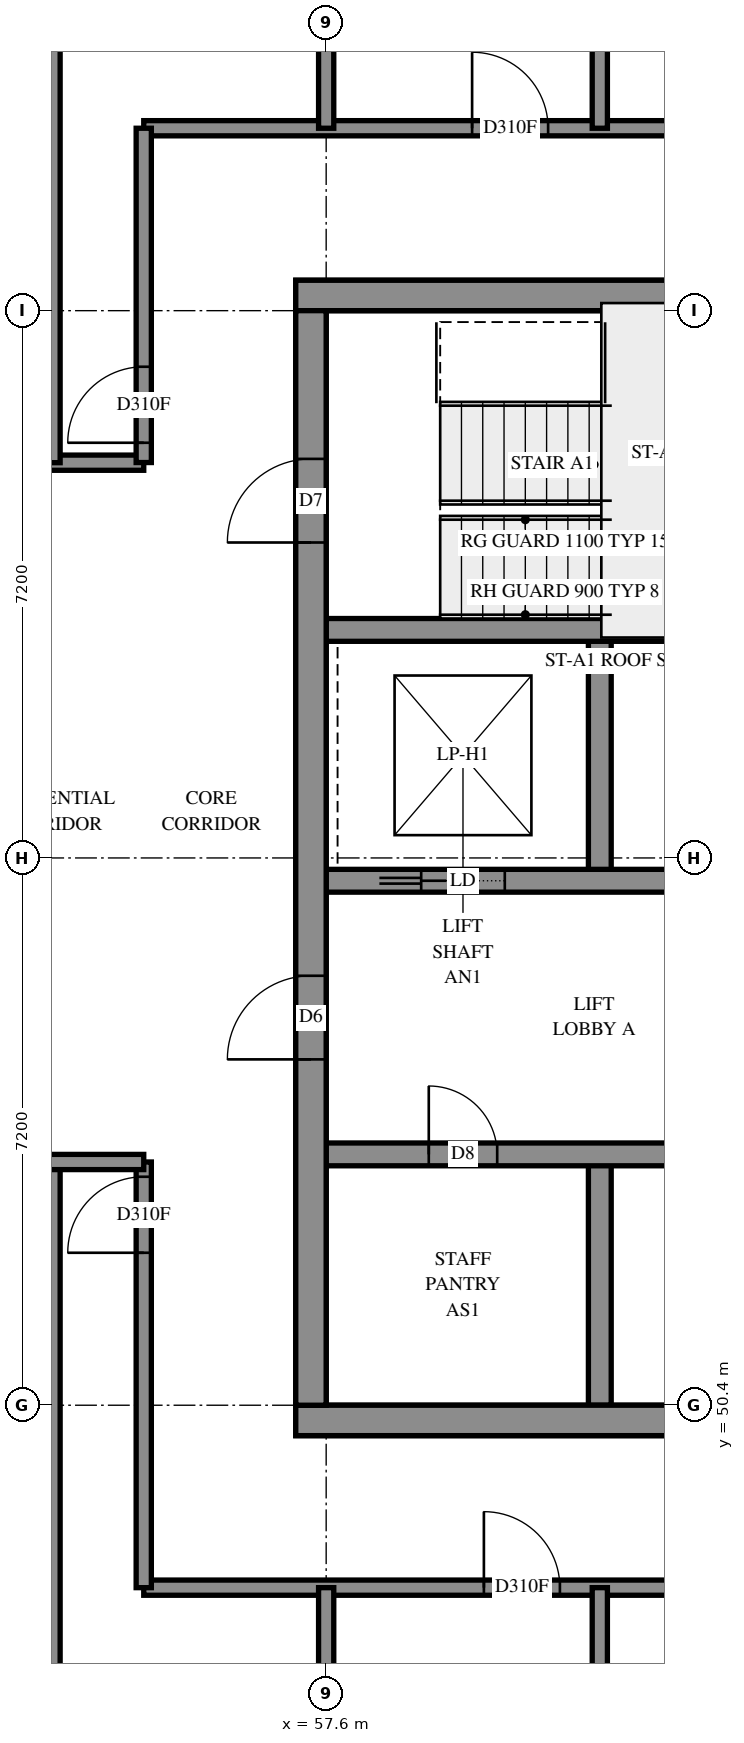
"""IFC4 building model, lengths in metres.
Left out: names, types, materials, properties, quantities, classifications, styles, units other than length and angle.
Written with IfcOpenShell. Run it as: python <this file> out.ifc"""

import sys

from ifc_helpers import new_model, si_unit, direction, frame, frame_2d, origin, place, context, subcontext, project, spatial, rectangle, extrude, element, fill, save


model = new_model("IFC4")
c1 = context("Model", 3, precision=1e-05, world=origin(), true_north=direction((0.0, 1.0)))
c2 = subcontext(c1, "Body", "Model", "MODEL_VIEW")
j1 = project(units=[si_unit("LENGTHUNIT", "METRE"), si_unit("PLANEANGLEUNIT", "RADIAN")], contexts=[c1])
p1 = place(None, origin())
s1 = spatial("IfcSite", under=j1, at=p1, CompositionType="ELEMENT")
p2 = place(p1, origin())
s2 = spatial("IfcBuilding", under=s1, at=p2, CompositionType="ELEMENT")
p3 = place(p2, frame((0.0, 0.0, 267.6)))
s3 = spatial("IfcBuildingStorey", under=s2, at=p3, CompositionType="ELEMENT", Elevation=267.6)
p4 = place(p3, frame((57.2, 50.2, -0.3), z_axis=(0.0, 0.0, 1.0), x_axis=(1.0, 0.0, 0.0)))
e1 = element("IfcWall", 1, at=p4, inside=s3, PredefinedType="SHEAR", context=c2, shape_type="SweptSolid", body=[
    extrude(rectangle(XDim=15.2, YDim=0.4, at=frame_2d((7.6, 0.0))), origin(), (0.0, 0.0, 1.0), 2.7),
])
p5 = place(p3, frame((57.2, 65.0, -0.3), z_axis=(0.0, 0.0, 1.0), x_axis=(1.0, 0.0, 0.0)))
e2 = element("IfcWall", 2, at=p5, inside=s3, PredefinedType="SHEAR", context=c2, shape_type="SweptSolid", body=[
    extrude(rectangle(XDim=15.2, YDim=0.4, at=frame_2d((7.6, 0.0))), origin(), (0.0, 0.0, 1.0), 2.7),
])
p6 = place(p5, frame((10.4, 0.0, 0.3)))
e3 = element("IfcOpeningElement", 3, at=p6, cuts=e2, PredefinedType="OPENING", context=c2, shape_type="SweptSolid", body=[
    extrude(rectangle(XDim=0.8, YDim=2.1, at=frame_2d((0.4, 1.05))), frame((0.0, 0.21, 0.0), z_axis=(0.0, -1.0, 0.0), x_axis=(1.0, 0.0, 0.0)), (0.0, 0.0, 1.0), 0.42),
])
p7 = place(p3, frame((57.4, 50.4, -0.3), z_axis=(0.0, 0.0, 1.0), x_axis=(0.0, 1.0, 0.0)))
e4 = element("IfcWall", 4, at=p7, inside=s3, PredefinedType="SHEAR", context=c2, shape_type="SweptSolid", body=[
    extrude(rectangle(XDim=14.4, YDim=0.4, at=frame_2d((7.2, 0.0))), origin(), (0.0, 0.0, 1.0), 2.7),
])
p8 = place(p7, frame((4.55, 0.0, 0.3)))
e5 = element("IfcOpeningElement", 5, at=p8, cuts=e4, PredefinedType="OPENING", context=c2, shape_type="SweptSolid", body=[
    extrude(rectangle(XDim=1.1, YDim=2.1, at=frame_2d((0.55, 1.05))), frame((0.0, 0.21, 0.0), z_axis=(0.0, -1.0, 0.0), x_axis=(1.0, 0.0, 0.0)), (0.0, 0.0, 1.0), 0.42),
])
p9 = place(p7, frame((11.35, 0.0, 0.3)))
e6 = element("IfcOpeningElement", 6, at=p9, cuts=e4, PredefinedType="OPENING", context=c2, shape_type="SweptSolid", body=[
    extrude(rectangle(XDim=1.1, YDim=2.1, at=frame_2d((0.55, 1.05))), frame((0.0, 0.21, 0.0), z_axis=(0.0, -1.0, 0.0), x_axis=(1.0, 0.0, 0.0)), (0.0, 0.0, 1.0), 0.42),
])
for number, where, z_axis, x_axis in (
    (7, (61.2, 50.4, 0.0), (0.0, 0.0, 1.0), (0.0, 1.0, 0.0)),
    (8, (61.2, 57.3, 0.0), (0.0, 0.0, 1.0), (0.0, 1.0, 0.0)),
):
    element("IfcWall", number, at=place(p3, frame(where, z_axis=z_axis, x_axis=x_axis)), inside=s3, PredefinedType="SOLIDWALL", context=c2, shape_type="SweptSolid", body=[
        extrude(rectangle(XDim=3.3, YDim=0.3, at=frame_2d((1.65, 0.0))), origin(), (0.0, 0.0, 1.0), 3.1),
    ])
p10 = place(p3, frame((57.6, 53.7, 0.0), z_axis=(0.0, 0.0, 1.0), x_axis=(1.0, 0.0, 0.0)))
e9 = element("IfcWall", 9, at=p10, inside=s3, PredefinedType="SOLIDWALL", context=c2, shape_type="SweptSolid", body=[
    extrude(rectangle(XDim=14.4, YDim=0.3, at=frame_2d((7.2, 0.0))), origin(), (0.0, 0.0, 1.0), 3.1),
])
p11 = place(p10, frame((1.35, 0.0, 0.0)))
e10 = element("IfcOpeningElement", 10, at=p11, cuts=e9, PredefinedType="OPENING", context=c2, shape_type="SweptSolid", body=[
    extrude(rectangle(XDim=0.9, YDim=2.1, at=frame_2d((0.45, 1.05))), frame((0.0, 0.16, 0.0), z_axis=(0.0, -1.0, 0.0), x_axis=(1.0, 0.0, 0.0)), (0.0, 0.0, 1.0), 0.32),
])
p12 = place(p10, frame((4.95, 0.0, 0.0)))
e11 = element("IfcOpeningElement", 11, at=p12, cuts=e9, PredefinedType="OPENING", context=c2, shape_type="SweptSolid", body=[
    extrude(rectangle(XDim=0.9, YDim=2.1, at=frame_2d((0.45, 1.05))), frame((0.0, 0.16, 0.0), z_axis=(0.0, -1.0, 0.0), x_axis=(1.0, 0.0, 0.0)), (0.0, 0.0, 1.0), 0.32),
])
p13 = place(p10, frame((8.55, 0.0, 0.0)))
e12 = element("IfcOpeningElement", 12, at=p13, cuts=e9, PredefinedType="OPENING", context=c2, shape_type="SweptSolid", body=[
    extrude(rectangle(XDim=0.9, YDim=2.1, at=frame_2d((0.45, 1.05))), frame((0.0, 0.16, 0.0), z_axis=(0.0, -1.0, 0.0), x_axis=(1.0, 0.0, 0.0)), (0.0, 0.0, 1.0), 0.32),
])
p14 = place(p10, frame((12.05, 0.0, 0.0)))
e13 = element("IfcOpeningElement", 13, at=p14, cuts=e9, PredefinedType="OPENING", context=c2, shape_type="SweptSolid", body=[
    extrude(rectangle(XDim=1.1, YDim=2.1, at=frame_2d((0.55, 1.05))), frame((0.0, 0.16, 0.0), z_axis=(0.0, -1.0, 0.0), x_axis=(1.0, 0.0, 0.0)), (0.0, 0.0, 1.0), 0.32),
])
p15 = place(p3, frame((57.6, 57.3, 0.0), z_axis=(0.0, 0.0, 1.0), x_axis=(1.0, 0.0, 0.0)))
e14 = element("IfcWall", 14, at=p15, inside=s3, PredefinedType="SOLIDWALL", context=c2, shape_type="SweptSolid", body=[
    extrude(rectangle(XDim=14.4, YDim=0.3, at=frame_2d((7.2, 0.0))), origin(), (0.0, 0.0, 1.0), 3.1),
])
p16 = place(p15, frame((8.55, 0.0, 0.0)))
e15 = element("IfcOpeningElement", 15, at=p16, cuts=e14, PredefinedType="OPENING", context=c2, shape_type="SweptSolid", body=[
    extrude(rectangle(XDim=0.9, YDim=2.1, at=frame_2d((0.45, 1.05))), frame((0.0, 0.16, 0.0), z_axis=(0.0, -1.0, 0.0), x_axis=(1.0, 0.0, 0.0)), (0.0, 0.0, 1.0), 0.32),
])
p17 = place(p15, frame((1.25, 0.0, 0.0)))
e16 = element("IfcOpeningElement", 16, at=p17, cuts=e14, PredefinedType="OPENING", context=c2, shape_type="SweptSolid", body=[
    extrude(rectangle(XDim=1.1, YDim=2.1, at=frame_2d((0.55, 1.05))), frame((0.0, 0.16, 0.0), z_axis=(0.0, -1.0, 0.0), x_axis=(1.0, 0.0, 0.0)), (0.0, 0.0, 1.0), 0.32),
])
p18 = place(p15, frame((4.85, 0.0, 0.0)))
e17 = element("IfcOpeningElement", 17, at=p18, cuts=e14, PredefinedType="OPENING", context=c2, shape_type="SweptSolid", body=[
    extrude(rectangle(XDim=1.1, YDim=2.1, at=frame_2d((0.55, 1.05))), frame((0.0, 0.16, 0.0), z_axis=(0.0, -1.0, 0.0), x_axis=(1.0, 0.0, 0.0)), (0.0, 0.0, 1.0), 0.32),
])
p19 = place(p15, frame((12.05, 0.0, 0.0)))
e18 = element("IfcOpeningElement", 18, at=p19, cuts=e14, PredefinedType="OPENING", context=c2, shape_type="SweptSolid", body=[
    extrude(rectangle(XDim=1.1, YDim=2.1, at=frame_2d((0.55, 1.05))), frame((0.0, 0.16, 0.0), z_axis=(0.0, -1.0, 0.0), x_axis=(1.0, 0.0, 0.0)), (0.0, 0.0, 1.0), 0.32),
])
p20 = place(p3, frame((57.6, 60.6, 0.0), z_axis=(0.0, 0.0, 1.0), x_axis=(1.0, 0.0, 0.0)))
e19 = element("IfcWall", 19, at=p20, inside=s3, PredefinedType="SOLIDWALL", context=c2, shape_type="SweptSolid", body=[
    extrude(rectangle(XDim=7.2, YDim=0.3, at=frame_2d((3.6, 0.0))), origin(), (0.0, 0.0, 1.0), 3.1),
])
p21 = place(p3, frame((55.2, 67.2, 0.0), z_axis=(0.0, 0.0, 1.0), x_axis=(1.0, 0.0, 0.0)))
e20 = element("IfcWall", 20, at=p21, inside=s3, PredefinedType="PARTITIONING", context=c2, shape_type="SweptSolid", body=[
    extrude(rectangle(XDim=19.2, YDim=0.2, at=frame_2d((9.6, 0.0))), origin(), (0.0, 0.0, 1.0), 3.1),
])
p22 = place(p21, frame((4.32, 0.0, 0.0)))
e21 = element("IfcOpeningElement", 21, at=p22, cuts=e20, PredefinedType="OPENING", context=c2, shape_type="SweptSolid", body=[
    extrude(rectangle(XDim=1.0, YDim=2.1, at=frame_2d((0.5, 1.05))), frame((0.0, 0.11, 0.0), z_axis=(0.0, -1.0, 0.0), x_axis=(1.0, 0.0, 0.0)), (0.0, 0.0, 1.0), 0.22),
])
p23 = place(p21, frame((8.338, 0.0, 0.0)))
e22 = element("IfcOpeningElement", 22, at=p23, cuts=e20, PredefinedType="OPENING", context=c2, shape_type="SweptSolid", body=[
    extrude(rectangle(XDim=1.0, YDim=2.1, at=frame_2d((0.5, 1.05))), frame((0.0, 0.11, 0.0), z_axis=(0.0, -1.0, 0.0), x_axis=(1.0, 0.0, 0.0)), (0.0, 0.0, 1.0), 0.22),
])
p24 = place(p21, frame((13.768, 0.0, 0.0)))
e23 = element("IfcOpeningElement", 23, at=p24, cuts=e20, PredefinedType="OPENING", context=c2, shape_type="SweptSolid", body=[
    extrude(rectangle(XDim=1.0, YDim=2.1, at=frame_2d((0.5, 1.05))), frame((0.0, 0.11, 0.0), z_axis=(0.0, -1.0, 0.0), x_axis=(1.0, 0.0, 0.0)), (0.0, 0.0, 1.0), 0.22),
])
p25 = place(p3, frame((55.2, 48.0, 0.0), z_axis=(0.0, 0.0, 1.0), x_axis=(1.0, 0.0, 0.0)))
e24 = element("IfcWall", 24, at=p25, inside=s3, PredefinedType="PARTITIONING", context=c2, shape_type="SweptSolid", body=[
    extrude(rectangle(XDim=19.15, YDim=0.2, at=frame_2d((9.575, 0.0))), origin(), (0.0, 0.0, 1.0), 3.1),
])
p26 = place(p25, frame((4.475, 0.0, 0.0)))
e25 = element("IfcOpeningElement", 25, at=p26, cuts=e24, PredefinedType="OPENING", context=c2, shape_type="SweptSolid", body=[
    extrude(rectangle(XDim=1.0, YDim=2.1, at=frame_2d((0.5, 1.05))), frame((0.0, 0.11, 0.0), z_axis=(0.0, -1.0, 0.0), x_axis=(1.0, 0.0, 0.0)), (0.0, 0.0, 1.0), 0.22),
])
p27 = place(p25, frame((8.301, 0.0, 0.0)))
e26 = element("IfcOpeningElement", 26, at=p27, cuts=e24, PredefinedType="OPENING", context=c2, shape_type="SweptSolid", body=[
    extrude(rectangle(XDim=0.9, YDim=2.1, at=frame_2d((0.45, 1.05))), frame((0.0, 0.11, 0.0), z_axis=(0.0, -1.0, 0.0), x_axis=(1.0, 0.0, 0.0)), (0.0, 0.0, 1.0), 0.22),
])
p28 = place(p25, frame((13.707, 0.0, 0.0)))
e27 = element("IfcOpeningElement", 27, at=p28, cuts=e24, PredefinedType="OPENING", context=c2, shape_type="SweptSolid", body=[
    extrude(rectangle(XDim=1.0, YDim=2.1, at=frame_2d((0.5, 1.05))), frame((0.0, 0.11, 0.0), z_axis=(0.0, -1.0, 0.0), x_axis=(1.0, 0.0, 0.0)), (0.0, 0.0, 1.0), 0.22),
])
p29 = place(p3, frame((40.61, 62.8, 0.0), z_axis=(0.0, 0.0, 1.0), x_axis=(1.0, 0.0, 0.0)))
e28 = element("IfcWall", 28, at=p29, inside=s3, PredefinedType="PARTITIONING", context=c2, shape_type="SweptSolid", body=[
    extrude(rectangle(XDim=14.59, YDim=0.2, at=frame_2d((7.295, 0.0))), origin(), (0.0, 0.0, 1.0), 3.1),
])
p30 = place(p29, frame((1.82, 0.0, 0.0)))
e29 = element("IfcOpeningElement", 29, at=p30, cuts=e28, PredefinedType="OPENING", context=c2, shape_type="SweptSolid", body=[
    extrude(rectangle(XDim=1.0, YDim=2.1, at=frame_2d((0.5, 1.05))), frame((0.0, 0.11, 0.0), z_axis=(0.0, -1.0, 0.0), x_axis=(1.0, 0.0, 0.0)), (0.0, 0.0, 1.0), 0.22),
])
p31 = place(p29, frame((6.758, 0.0, 0.0)))
e30 = element("IfcOpeningElement", 30, at=p31, cuts=e28, PredefinedType="OPENING", context=c2, shape_type="SweptSolid", body=[
    extrude(rectangle(XDim=1.0, YDim=2.1, at=frame_2d((0.5, 1.05))), frame((0.0, 0.11, 0.0), z_axis=(0.0, -1.0, 0.0), x_axis=(1.0, 0.0, 0.0)), (0.0, 0.0, 1.0), 0.22),
])
p32 = place(p29, frame((10.005, 0.0, 0.0)))
e31 = element("IfcOpeningElement", 31, at=p32, cuts=e28, PredefinedType="OPENING", context=c2, shape_type="SweptSolid", body=[
    extrude(rectangle(XDim=1.0, YDim=2.1, at=frame_2d((0.5, 1.05))), frame((0.0, 0.11, 0.0), z_axis=(0.0, -1.0, 0.0), x_axis=(1.0, 0.0, 0.0)), (0.0, 0.0, 1.0), 0.22),
])
p33 = place(p3, frame((54.0, 42.285, 0.0), z_axis=(0.0, 0.0, 1.0), x_axis=(0.0, 1.0, 0.0)))
e32 = element("IfcWall", 32, at=p33, inside=s3, PredefinedType="PARTITIONING", context=c2, shape_type="SweptSolid", body=[
    extrude(rectangle(XDim=11.315, YDim=0.2, at=frame_2d((5.657, 0.0))), origin(), (0.0, 0.0, 1.0), 3.1),
])
p34 = place(p3, frame((54.0, 62.8, 0.0), z_axis=(0.0, 0.0, 1.0), x_axis=(0.0, 1.0, 0.0)))
e33 = element("IfcWall", 33, at=p34, inside=s3, PredefinedType="PARTITIONING", context=c2, shape_type="SweptSolid", body=[
    extrude(rectangle(XDim=10.036, YDim=0.2, at=frame_2d((5.018, 0.0))), origin(), (0.0, 0.0, 1.0), 3.1),
])
p35 = place(p3, frame((61.2, 42.288, 0.0), z_axis=(0.0, 0.0, 1.0), x_axis=(0.0, 1.0, 0.0)))
e34 = element("IfcWall", 34, at=p35, inside=s3, PredefinedType="PARTITIONING", context=c2, shape_type="SweptSolid", body=[
    extrude(rectangle(XDim=5.712, YDim=0.2, at=frame_2d((2.856, 0.0))), origin(), (0.0, 0.0, 1.0), 3.1),
])
p36 = place(p3, frame((55.2, 48.0, 0.0), z_axis=(0.0, 0.0, 1.0), x_axis=(0.0, 1.0, 0.0)))
e35 = element("IfcWall", 35, at=p36, inside=s3, PredefinedType="PARTITIONING", context=c2, shape_type="SweptSolid", body=[
    extrude(rectangle(XDim=5.6, YDim=0.2, at=frame_2d((2.8, 0.0))), origin(), (0.0, 0.0, 1.0), 3.1),
])
p37 = place(p36, frame((4.406, 0.0, 0.0)))
e36 = element("IfcOpeningElement", 36, at=p37, cuts=e35, PredefinedType="OPENING", context=c2, shape_type="SweptSolid", body=[
    extrude(rectangle(XDim=1.0, YDim=2.1, at=frame_2d((0.5, 1.05))), frame((0.0, 0.11, 0.0), z_axis=(0.0, -1.0, 0.0), x_axis=(1.0, 0.0, 0.0)), (0.0, 0.0, 1.0), 0.22),
])
p38 = place(p3, frame((61.2, 67.2, 0.0), z_axis=(0.0, 0.0, 1.0), x_axis=(0.0, 1.0, 0.0)))
e37 = element("IfcWall", 37, at=p38, inside=s3, PredefinedType="PARTITIONING", context=c2, shape_type="SweptSolid", body=[
    extrude(rectangle(XDim=5.574, YDim=0.2, at=frame_2d((2.787, 0.0))), origin(), (0.0, 0.0, 1.0), 3.1),
])
p39 = place(p3, frame((50.4, 53.6, 0.0), z_axis=(0.0, 0.0, 1.0), x_axis=(1.0, 0.0, 0.0)))
e38 = element("IfcWall", 38, at=p39, inside=s3, PredefinedType="PARTITIONING", context=c2, shape_type="SweptSolid", body=[
    extrude(rectangle(XDim=4.8, YDim=0.2, at=frame_2d((2.4, 0.0))), origin(), (0.0, 0.0, 1.0), 3.1),
])
p40 = place(p39, frame((2.075, 0.0, 0.0)))
e39 = element("IfcOpeningElement", 39, at=p40, cuts=e38, PredefinedType="OPENING", context=c2, shape_type="SweptSolid", body=[
    extrude(rectangle(XDim=1.0, YDim=2.1, at=frame_2d((0.5, 1.05))), frame((0.0, 0.11, 0.0), z_axis=(0.0, -1.0, 0.0), x_axis=(1.0, 0.0, 0.0)), (0.0, 0.0, 1.0), 0.22),
])
p41 = place(p3, frame((57.6, 43.55, 0.0), z_axis=(0.0, 0.0, 1.0), x_axis=(0.0, 1.0, 0.0)))
e40 = element("IfcWall", 40, at=p41, inside=s3, PredefinedType="PARTITIONING", context=c2, shape_type="SweptSolid", body=[
    extrude(rectangle(XDim=4.45, YDim=0.2, at=frame_2d((2.225, 0.0))), origin(), (0.0, 0.0, 1.0), 3.1),
])
p42 = place(p3, frame((55.2, 62.802, 0.0), z_axis=(0.0, 0.0, 1.0), x_axis=(0.0, 1.0, 0.0)))
e41 = element("IfcWall", 41, at=p42, inside=s3, PredefinedType="PARTITIONING", context=c2, shape_type="SweptSolid", body=[
    extrude(rectangle(XDim=4.398, YDim=0.2, at=frame_2d((2.199, 0.0))), origin(), (0.0, 0.0, 1.0), 3.1),
])
p43 = place(p42, frame((0.26, 0.0, 0.0)))
e42 = element("IfcOpeningElement", 42, at=p43, cuts=e41, PredefinedType="OPENING", context=c2, shape_type="SweptSolid", body=[
    extrude(rectangle(XDim=1.0, YDim=2.1, at=frame_2d((0.5, 1.05))), frame((0.0, 0.11, 0.0), z_axis=(0.0, -1.0, 0.0), x_axis=(1.0, 0.0, 0.0)), (0.0, 0.0, 1.0), 0.22),
])
p44 = place(p3, frame((57.6, 67.2, 0.0), z_axis=(0.0, 0.0, 1.0), x_axis=(0.0, 1.0, 0.0)))
e43 = element("IfcWall", 43, at=p44, inside=s3, PredefinedType="PARTITIONING", context=c2, shape_type="SweptSolid", body=[
    extrude(rectangle(XDim=4.346, YDim=0.2, at=frame_2d((2.173, 0.0))), origin(), (0.0, 0.0, 1.0), 3.1),
])
p45 = place(p8, origin())
e44 = element("IfcDoor", 44, at=p45, inside=s3, OperationType="DOUBLE_DOOR_SINGLE_SWING", PredefinedType="DOOR", context=c2, shape_type="SweptSolid", body=[
    extrude(rectangle(XDim=1.1, YDim=2.1, at=frame_2d((0.55, 1.05))), frame((0.0, 0.025, 0.0), z_axis=(0.0, -1.0, 0.0), x_axis=(1.0, 0.0, 0.0)), (0.0, 0.0, 1.0), 0.05),
])
fill(e5, e44)
p46 = place(p9, origin())
e45 = element("IfcDoor", 45, at=p46, inside=s3, OperationType="SINGLE_SWING_LEFT", PredefinedType="DOOR", context=c2, shape_type="SweptSolid", body=[
    extrude(rectangle(XDim=1.1, YDim=2.1, at=frame_2d((0.55, 1.05))), frame((0.0, 0.025, 0.0), z_axis=(0.0, -1.0, 0.0), x_axis=(1.0, 0.0, 0.0)), (0.0, 0.0, 1.0), 0.05),
])
fill(e6, e45)
p47 = place(p11, origin())
e46 = element("IfcDoor", 46, at=p47, inside=s3, OperationType="SINGLE_SWING_LEFT", PredefinedType="DOOR", context=c2, shape_type="SweptSolid", body=[
    extrude(rectangle(XDim=0.9, YDim=2.1, at=frame_2d((0.45, 1.05))), frame((0.0, 0.025, 0.0), z_axis=(0.0, -1.0, 0.0), x_axis=(1.0, 0.0, 0.0)), (0.0, 0.0, 1.0), 0.05),
])
fill(e10, e46)
p48 = place(p17, origin())
e47 = element("IfcDoor", 47, at=p48, inside=s3, OperationType="SLIDING_TO_LEFT", PredefinedType="DOOR", context=c2, shape_type="SweptSolid", body=[
    extrude(rectangle(XDim=1.1, YDim=2.1, at=frame_2d((0.55, 1.05))), frame((0.0, 0.025, 0.0), z_axis=(0.0, -1.0, 0.0), x_axis=(1.0, 0.0, 0.0)), (0.0, 0.0, 1.0), 0.05),
])
fill(e16, e47)
p49 = place(p37, origin())
e48 = element("IfcDoor", 48, at=p49, inside=s3, OperationType="SINGLE_SWING_RIGHT", PredefinedType="DOOR", context=c2, shape_type="SweptSolid", body=[
    extrude(rectangle(XDim=1.0, YDim=2.1, at=frame_2d((0.5, 1.05))), frame((0.0, 0.025, 0.0), z_axis=(0.0, -1.0, 0.0), x_axis=(1.0, 0.0, 0.0)), (0.0, 0.0, 1.0), 0.05),
])
fill(e36, e48)
p50 = place(p26, origin())
e49 = element("IfcDoor", 49, at=p50, inside=s3, OperationType="SINGLE_SWING_LEFT", PredefinedType="DOOR", context=c2, shape_type="SweptSolid", body=[
    extrude(rectangle(XDim=1.0, YDim=2.1, at=frame_2d((0.5, 1.05))), frame((0.0, 0.025, 0.0), z_axis=(0.0, -1.0, 0.0), x_axis=(1.0, 0.0, 0.0)), (0.0, 0.0, 1.0), 0.05),
])
fill(e25, e49)
p51 = place(p43, origin())
e50 = element("IfcDoor", 50, at=p51, inside=s3, OperationType="SINGLE_SWING_LEFT", PredefinedType="DOOR", context=c2, shape_type="SweptSolid", body=[
    extrude(rectangle(XDim=1.0, YDim=2.1, at=frame_2d((0.5, 1.05))), frame((0.0, 0.025, 0.0), z_axis=(0.0, -1.0, 0.0), x_axis=(1.0, 0.0, 0.0)), (0.0, 0.0, 1.0), 0.05),
])
fill(e42, e50)
p52 = place(p22, origin())
e51 = element("IfcDoor", 51, at=p52, inside=s3, OperationType="SINGLE_SWING_RIGHT", PredefinedType="DOOR", context=c2, shape_type="SweptSolid", body=[
    extrude(rectangle(XDim=1.0, YDim=2.1, at=frame_2d((0.5, 1.05))), frame((0.0, 0.025, 0.0), z_axis=(0.0, -1.0, 0.0), x_axis=(1.0, 0.0, 0.0)), (0.0, 0.0, 1.0), 0.05),
])
fill(e21, e51)
save(model, sys.argv[1])
